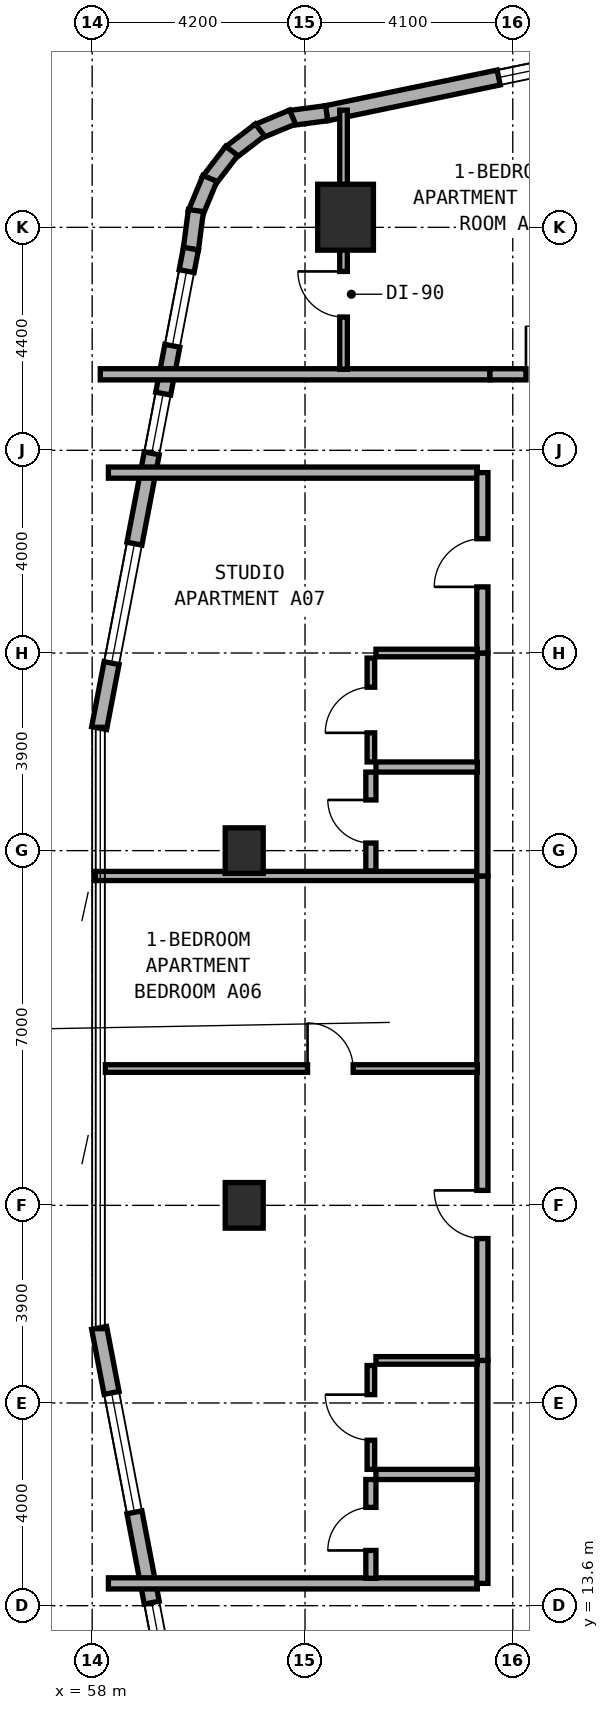
"""IFC4 building model, lengths in metres.
Left out: names, types, materials, properties, quantities, classifications, styles, units other than length and angle.
Written with IfcOpenShell. Run it as: python <this file> out.ifc"""

import sys

from ifc_helpers import new_model, si_unit, direction, frame, frame_2d, origin, origin_2d, place, context, subcontext, project, spatial, rectangle, extrude, element, fill, save


model = new_model("IFC4")
c1 = context("Model", 3, precision=1e-05, world=origin(), true_north=direction((0.0, 1.0)))
c2 = subcontext(c1, "Body", "Model", "MODEL_VIEW")
j1 = project(units=[si_unit("LENGTHUNIT", "METRE"), si_unit("PLANEANGLEUNIT", "RADIAN")], contexts=[c1])
p1 = place(None, origin())
s1 = spatial("IfcSite", under=j1, at=p1, CompositionType="ELEMENT")
p2 = place(p1, origin())
s2 = spatial("IfcBuilding", under=s1, at=p2, CompositionType="ELEMENT")
p3 = place(p2, frame((0.0, 0.0, 31.0)))
s3 = spatial("IfcBuildingStorey", under=s2, at=p3, CompositionType="ELEMENT", Elevation=31.0)
for number, where, z_axis, x_axis in (
    (1, (61.0, 21.5, 0.0), (0.0, 0.0, 1.0), (1.0, 0.0, 0.0)),
    (2, (61.0, 28.5, 0.0), (0.0, 0.0, 1.0), (1.0, 0.0, 0.0)),
):
    element("IfcColumn", number, at=place(p3, frame(where, z_axis=z_axis, x_axis=x_axis)), inside=s3, PredefinedType="COLUMN", context=c2, shape_type="SweptSolid", body=[
        extrude(rectangle(XDim=0.75, YDim=0.9, at=origin_2d()), origin(), (0.0, 0.0, 1.0), 3.5),
    ])
p4 = place(p3, frame((63.0, 41.0, 0.0), z_axis=(0.0, 0.0, 1.0), x_axis=(1.0, 0.0, 0.0)))
e3 = element("IfcColumn", 3, at=p4, inside=s3, PredefinedType="COLUMN", context=c2, shape_type="SweptSolid", body=[
    extrude(rectangle(XDim=1.1, YDim=1.3, at=origin_2d()), origin(), (0.0, 0.0, 1.0), 3.5),
])
p5 = place(p3, frame((71.356, 44.864, 0.0), z_axis=(0.0, 0.0, 1.0), x_axis=(-0.979127260729, -0.203248142175, 0.0)))
e4 = element("IfcWall", 4, at=p5, inside=s3, PredefinedType="STANDARD", context=c2, shape_type="SweptSolid", body=[
    extrude(rectangle(XDim=8.92, YDim=0.3, at=frame_2d((4.46, 0.0))), origin(), (0.0, 0.0, 1.0), 3.25),
])
p6 = place(p5, frame((3.048, 0.0, 0.8)))
e5 = element("IfcOpeningElement", 5, at=p6, cuts=e4, PredefinedType="OPENING", context=c2, shape_type="SweptSolid", body=[
    extrude(rectangle(XDim=2.4, YDim=1.6, at=frame_2d((1.2, 0.8))), frame((0.0, 0.16, 0.0), z_axis=(0.0, -1.0, 0.0), x_axis=(1.0, 0.0, 0.0)), (0.0, 0.0, 1.0), 0.32),
])
p7 = place(p3, frame((62.627, 43.052, 0.0), z_axis=(0.0, 0.0, 1.0), x_axis=(-0.991480488834, -0.130255288807, 0.0)))
e6 = element("IfcWall", 6, at=p7, inside=s3, PredefinedType="STANDARD", context=c2, shape_type="SweptSolid", body=[
    extrude(rectangle(XDim=0.729, YDim=0.3, at=frame_2d((0.365, 0.0))), origin(), (0.0, 0.0, 1.0), 3.25),
])
for number, where, z_axis, x_axis in (
    (7, (61.955, 42.976, 0.0), (0.0, 0.0, 1.0), (-0.924, -0.384, 0.0)),
    (8, (61.311, 42.721, 0.0), (0.0, 0.0, 1.0), (-0.794, -0.608, 0.0)),
    (9, (60.754, 42.309, 0.0), (0.0, 0.0, 1.0), (-0.608, -0.794, 0.0)),
    (10, (60.324, 41.766, 0.0), (0.0, 0.0, 1.0), (-0.383, -0.924, 0.0)),
):
    element("IfcWall", number, at=place(p3, frame(where, z_axis=z_axis, x_axis=x_axis)), inside=s3, PredefinedType="STANDARD", context=c2, shape_type="SweptSolid", body=[
        extrude(rectangle(XDim=0.746, YDim=0.3, at=frame_2d((0.373, 0.0))), origin(), (0.0, 0.0, 1.0), 3.25),
    ])
p8 = place(p3, frame((60.047, 41.131, 0.0), z_axis=(0.0, 0.0, 1.0), x_axis=(-0.129653178221, -0.991559404866, 0.0)))
e11 = element("IfcWall", 11, at=p8, inside=s3, PredefinedType="STANDARD", context=c2, shape_type="SweptSolid", body=[
    extrude(rectangle(XDim=0.764, YDim=0.3, at=frame_2d((0.382, 0.0))), origin(), (0.0, 0.0, 1.0), 3.25),
])
p9 = place(p3, frame((59.949, 40.38, 0.0), z_axis=(0.0, 0.0, 1.0), x_axis=(-0.188087874316, -0.982152203854, 0.0)))
e12 = element("IfcWall", 12, at=p9, inside=s3, PredefinedType="STANDARD", context=c2, shape_type="SweptSolid", body=[
    extrude(rectangle(XDim=9.634, YDim=0.3, at=frame_2d((4.817, 0.0))), origin(), (0.0, 0.0, 1.0), 3.25),
])
p10 = place(p9, frame((0.452, 0.0, 0.85)))
e13 = element("IfcOpeningElement", 13, at=p10, cuts=e12, PredefinedType="OPENING", context=c2, shape_type="SweptSolid", body=[
    extrude(rectangle(XDim=1.5, YDim=1.5, at=frame_2d((0.75, 0.75))), frame((0.0, 0.16, 0.0), z_axis=(0.0, -1.0, 0.0), x_axis=(1.0, 0.0, 0.0)), (0.0, 0.0, 1.0), 0.32),
])
p11 = place(p9, frame((2.913, 0.0, 0.85)))
e14 = element("IfcOpeningElement", 14, at=p11, cuts=e12, PredefinedType="OPENING", context=c2, shape_type="SweptSolid", body=[
    extrude(rectangle(XDim=1.2, YDim=1.5, at=frame_2d((0.6, 0.75))), frame((0.0, 0.16, 0.0), z_axis=(0.0, -1.0, 0.0), x_axis=(1.0, 0.0, 0.0)), (0.0, 0.0, 1.0), 0.32),
])
p12 = place(p9, frame((5.928, 0.0, 0.8)))
e15 = element("IfcOpeningElement", 15, at=p12, cuts=e12, PredefinedType="OPENING", context=c2, shape_type="SweptSolid", body=[
    extrude(rectangle(XDim=2.4, YDim=1.6, at=frame_2d((1.2, 0.8))), frame((0.0, 0.16, 0.0), z_axis=(0.0, -1.0, 0.0), x_axis=(1.0, 0.0, 0.0)), (0.0, 0.0, 1.0), 0.32),
])
p13 = place(p3, frame((58.137, 19.082, 0.0), z_axis=(0.0, 0.0, 1.0), x_axis=(0.188087874316, -0.982152203854, 0.0)))
e16 = element("IfcWall", 16, at=p13, inside=s3, PredefinedType="STANDARD", context=c2, shape_type="SweptSolid", body=[
    extrude(rectangle(XDim=9.634, YDim=0.3, at=frame_2d((4.817, 0.0))), origin(), (0.0, 0.0, 1.0), 3.25),
])
p14 = place(p13, frame((1.306, 0.0, 0.8)))
e17 = element("IfcOpeningElement", 17, at=p14, cuts=e16, PredefinedType="OPENING", context=c2, shape_type="SweptSolid", body=[
    extrude(rectangle(XDim=2.4, YDim=1.6, at=frame_2d((1.2, 0.8))), frame((0.0, 0.16, 0.0), z_axis=(0.0, -1.0, 0.0), x_axis=(1.0, 0.0, 0.0)), (0.0, 0.0, 1.0), 0.32),
])
p15 = place(p13, frame((5.521, 0.0, 0.85)))
e18 = element("IfcOpeningElement", 18, at=p15, cuts=e16, PredefinedType="OPENING", context=c2, shape_type="SweptSolid", body=[
    extrude(rectangle(XDim=1.2, YDim=1.5, at=frame_2d((0.6, 0.75))), frame((0.0, 0.16, 0.0), z_axis=(0.0, -1.0, 0.0), x_axis=(1.0, 0.0, 0.0)), (0.0, 0.0, 1.0), 0.32),
])
p16 = place(p13, frame((7.682, 0.0, 0.85)))
e19 = element("IfcOpeningElement", 19, at=p16, cuts=e16, PredefinedType="OPENING", context=c2, shape_type="SweptSolid", body=[
    extrude(rectangle(XDim=1.5, YDim=1.5, at=frame_2d((0.75, 0.75))), frame((0.0, 0.16, 0.0), z_axis=(0.0, -1.0, 0.0), x_axis=(1.0, 0.0, 0.0)), (0.0, 0.0, 1.0), 0.32),
])
p17 = place(p3, frame((58.16, 37.9, 0.0), z_axis=(0.0, 0.0, 1.0), x_axis=(1.0, 0.0, 0.0)))
e20 = element("IfcWall", 20, at=p17, inside=s3, PredefinedType="SOLIDWALL", context=c2, shape_type="SweptSolid", body=[
    extrude(rectangle(XDim=7.69, YDim=0.22, at=frame_2d((3.845, 0.0))), origin(), (0.0, 0.0, 1.0), 2.865),
])
p18 = place(p3, frame((65.85, 37.9, 0.0), z_axis=(0.0, 0.0, 1.0), x_axis=(1.0, 0.0, 0.0)))
e21 = element("IfcWall", 21, at=p18, inside=s3, PredefinedType="SOLIDWALL", context=c2, shape_type="SweptSolid", body=[
    extrude(rectangle(XDim=2.37, YDim=0.22, at=frame_2d((1.185, 0.0))), origin(), (0.0, 0.0, 1.0), 3.22),
])
p19 = place(p18, frame((0.71, 0.0, 0.0)))
e22 = element("IfcOpeningElement", 22, at=p19, cuts=e21, PredefinedType="OPENING", context=c2, shape_type="SweptSolid", body=[
    extrude(rectangle(XDim=0.95, YDim=2.1, at=frame_2d((0.475, 1.05))), frame((0.0, 0.12, 0.0), z_axis=(0.0, -1.0, 0.0), x_axis=(1.0, 0.0, 0.0)), (0.0, 0.0, 1.0), 0.24),
])
p20 = place(p3, frame((62.96, 38.0, 0.0), z_axis=(0.0, 0.0, 1.0), x_axis=(0.0, 1.0, 0.0)))
e23 = element("IfcWall", 23, at=p20, inside=s3, PredefinedType="PARTITIONING", context=c2, shape_type="SweptSolid", body=[
    extrude(rectangle(XDim=5.113, YDim=0.15, at=frame_2d((2.557, 0.0))), origin(), (0.0, 0.0, 1.0), 2.865),
])
p21 = place(p20, frame((1.03, 0.0, 0.0)))
e24 = element("IfcOpeningElement", 24, at=p21, cuts=e23, PredefinedType="OPENING", context=c2, shape_type="SweptSolid", body=[
    extrude(rectangle(XDim=0.9, YDim=2.1, at=frame_2d((0.45, 1.05))), frame((0.0, 0.085, 0.0), z_axis=(0.0, -1.0, 0.0), x_axis=(1.0, 0.0, 0.0)), (0.0, 0.0, 1.0), 0.17),
])
for number, where, z_axis, x_axis in (
    (25, (58.32, 14.04, 0.0), (0.0, 0.0, 1.0), (1.0, 0.0, 0.0)),
    (26, (58.32, 35.96, 0.0), (0.0, 0.0, 1.0), (1.0, 0.0, 0.0)),
):
    element("IfcWall", number, at=place(p3, frame(where, z_axis=z_axis, x_axis=x_axis)), inside=s3, PredefinedType="SOLIDWALL", context=c2, shape_type="SweptSolid", body=[
        extrude(rectangle(XDim=7.28, YDim=0.22, at=frame_2d((3.64, 0.0))), origin(), (0.0, 0.0, 1.0), 2.865),
    ])
p22 = place(p3, frame((58.06, 28.0, 0.0), z_axis=(0.0, 0.0, 1.0), x_axis=(1.0, 0.0, 0.0)))
e27 = element("IfcWall", 27, at=p22, inside=s3, PredefinedType="SOLIDWALL", context=c2, shape_type="SweptSolid", body=[
    extrude(rectangle(XDim=7.64, YDim=0.18, at=frame_2d((3.82, 0.0))), origin(), (0.0, 0.0, 1.0), 2.865),
])
p23 = place(p3, frame((65.7, 14.04, 0.0), z_axis=(0.0, 0.0, 1.0), x_axis=(0.0, 1.0, 0.0)))
e28 = element("IfcWall", 28, at=p23, inside=s3, PredefinedType="SOLIDWALL", context=c2, shape_type="SweptSolid", body=[
    extrude(rectangle(XDim=4.4, YDim=0.22, at=frame_2d((2.2, 0.0))), origin(), (0.0, 0.0, 1.0), 3.22),
])
p24 = place(p3, frame((65.7, 18.44, 0.0), z_axis=(0.0, 0.0, 1.0), x_axis=(0.0, 1.0, 0.0)))
e29 = element("IfcWall", 29, at=p24, inside=s3, PredefinedType="SOLIDWALL", context=c2, shape_type="SweptSolid", body=[
    extrude(rectangle(XDim=9.56, YDim=0.22, at=frame_2d((4.78, 0.0))), origin(), (0.0, 0.0, 1.0), 2.725),
])
p25 = place(p24, frame((2.405, 0.0, 0.0)))
e30 = element("IfcOpeningElement", 30, at=p25, cuts=e29, PredefinedType="OPENING", context=c2, shape_type="SweptSolid", body=[
    extrude(rectangle(XDim=0.95, YDim=2.1, at=frame_2d((0.475, 1.05))), frame((0.0, 0.12, 0.0), z_axis=(0.0, -1.0, 0.0), x_axis=(1.0, 0.0, 0.0)), (0.0, 0.0, 1.0), 0.24),
])
p26 = place(p3, frame((58.26, 24.2, 0.0), z_axis=(0.0, 0.0, 1.0), x_axis=(1.0, 0.0, 0.0)))
e31 = element("IfcWall", 31, at=p26, inside=s3, PredefinedType="PARTITIONING", context=c2, shape_type="SweptSolid", body=[
    extrude(rectangle(XDim=7.34, YDim=0.15, at=frame_2d((3.67, 0.0))), origin(), (0.0, 0.0, 1.0), 2.865),
])
p27 = place(p26, frame((3.99, 0.0, 0.0)))
e32 = element("IfcOpeningElement", 32, at=p27, cuts=e31, PredefinedType="OPENING", context=c2, shape_type="SweptSolid", body=[
    extrude(rectangle(XDim=0.9, YDim=2.1, at=frame_2d((0.45, 1.05))), frame((0.0, 0.085, 0.0), z_axis=(0.0, -1.0, 0.0), x_axis=(1.0, 0.0, 0.0)), (0.0, 0.0, 1.0), 0.17),
])
p28 = place(p3, frame((63.6, 16.19, 0.0), z_axis=(0.0, 0.0, 1.0), x_axis=(1.0, 0.0, 0.0)))
e33 = element("IfcWall", 33, at=p28, inside=s3, PredefinedType="PLUMBINGWALL", context=c2, shape_type="SweptSolid", body=[
    extrude(rectangle(XDim=2.0, YDim=0.2, at=frame_2d((1.0, 0.0))), origin(), (0.0, 0.0, 1.0), 3.22),
])
p29 = place(p3, frame((63.6, 18.44, 0.0), z_axis=(0.0, 0.0, 1.0), x_axis=(1.0, 0.0, 0.0)))
e34 = element("IfcWall", 34, at=p29, inside=s3, PredefinedType="PARTITIONING", context=c2, shape_type="SweptSolid", body=[
    extrude(rectangle(XDim=2.0, YDim=0.15, at=frame_2d((1.0, 0.0))), origin(), (0.0, 0.0, 1.0), 3.22),
])
p30 = place(p3, frame((63.5, 14.14, 0.0), z_axis=(0.0, 0.0, 1.0), x_axis=(0.0, 1.0, 0.0)))
e35 = element("IfcWall", 35, at=p30, inside=s3, PredefinedType="PLUMBINGWALL", context=c2, shape_type="SweptSolid", body=[
    extrude(rectangle(XDim=1.95, YDim=0.2, at=frame_2d((0.975, 0.0))), origin(), (0.0, 0.0, 1.0), 3.22),
])
p31 = place(p30, frame((0.55, 0.0, 0.0)))
e36 = element("IfcOpeningElement", 36, at=p31, cuts=e35, PredefinedType="OPENING", context=c2, shape_type="SweptSolid", body=[
    extrude(rectangle(XDim=0.85, YDim=2.1, at=frame_2d((0.425, 1.05))), frame((0.0, 0.11, 0.0), z_axis=(0.0, -1.0, 0.0), x_axis=(1.0, 0.0, 0.0)), (0.0, 0.0, 1.0), 0.22),
])
p32 = place(p3, frame((63.5, 16.29, 0.0), z_axis=(0.0, 0.0, 1.0), x_axis=(0.0, 1.0, 0.0)))
e37 = element("IfcWall", 37, at=p32, inside=s3, PredefinedType="PARTITIONING", context=c2, shape_type="SweptSolid", body=[
    extrude(rectangle(XDim=2.05, YDim=0.15, at=frame_2d((1.025, 0.0))), origin(), (0.0, 0.0, 1.0), 3.22),
])
p33 = place(p32, frame((0.575, 0.0, 0.0)))
e38 = element("IfcOpeningElement", 38, at=p33, cuts=e37, PredefinedType="OPENING", context=c2, shape_type="SweptSolid", body=[
    extrude(rectangle(XDim=0.9, YDim=2.1, at=frame_2d((0.45, 1.05))), frame((0.0, 0.085, 0.0), z_axis=(0.0, -1.0, 0.0), x_axis=(1.0, 0.0, 0.0)), (0.0, 0.0, 1.0), 0.17),
])
p34 = place(p3, frame((65.7, 28.0, 0.0), z_axis=(0.0, 0.0, 1.0), x_axis=(0.0, 1.0, 0.0)))
e39 = element("IfcWall", 39, at=p34, inside=s3, PredefinedType="SOLIDWALL", context=c2, shape_type="SweptSolid", body=[
    extrude(rectangle(XDim=4.4, YDim=0.22, at=frame_2d((2.2, 0.0))), origin(), (0.0, 0.0, 1.0), 2.725),
])
p35 = place(p3, frame((65.7, 32.4, 0.0), z_axis=(0.0, 0.0, 1.0), x_axis=(0.0, 1.0, 0.0)))
e40 = element("IfcWall", 40, at=p35, inside=s3, PredefinedType="SOLIDWALL", context=c2, shape_type="SweptSolid", body=[
    extrude(rectangle(XDim=3.56, YDim=0.22, at=frame_2d((1.78, 0.0))), origin(), (0.0, 0.0, 1.0), 3.22),
])
p36 = place(p35, frame((1.305, 0.0, 0.0)))
e41 = element("IfcOpeningElement", 41, at=p36, cuts=e40, PredefinedType="OPENING", context=c2, shape_type="SweptSolid", body=[
    extrude(rectangle(XDim=0.95, YDim=2.1, at=frame_2d((0.475, 1.05))), frame((0.0, 0.12, 0.0), z_axis=(0.0, -1.0, 0.0), x_axis=(1.0, 0.0, 0.0)), (0.0, 0.0, 1.0), 0.24),
])
p37 = place(p3, frame((63.6, 30.15, 0.0), z_axis=(0.0, 0.0, 1.0), x_axis=(1.0, 0.0, 0.0)))
e42 = element("IfcWall", 42, at=p37, inside=s3, PredefinedType="PLUMBINGWALL", context=c2, shape_type="SweptSolid", body=[
    extrude(rectangle(XDim=2.0, YDim=0.2, at=frame_2d((1.0, 0.0))), origin(), (0.0, 0.0, 1.0), 3.22),
])
p38 = place(p3, frame((63.6, 32.4, 0.0), z_axis=(0.0, 0.0, 1.0), x_axis=(1.0, 0.0, 0.0)))
e43 = element("IfcWall", 43, at=p38, inside=s3, PredefinedType="PARTITIONING", context=c2, shape_type="SweptSolid", body=[
    extrude(rectangle(XDim=2.0, YDim=0.15, at=frame_2d((1.0, 0.0))), origin(), (0.0, 0.0, 1.0), 3.22),
])
p39 = place(p3, frame((63.5, 28.1, 0.0), z_axis=(0.0, 0.0, 1.0), x_axis=(0.0, 1.0, 0.0)))
e44 = element("IfcWall", 44, at=p39, inside=s3, PredefinedType="PLUMBINGWALL", context=c2, shape_type="SweptSolid", body=[
    extrude(rectangle(XDim=1.95, YDim=0.2, at=frame_2d((0.975, 0.0))), origin(), (0.0, 0.0, 1.0), 2.725),
])
p40 = place(p39, frame((0.55, 0.0, 0.0)))
e45 = element("IfcOpeningElement", 45, at=p40, cuts=e44, PredefinedType="OPENING", context=c2, shape_type="SweptSolid", body=[
    extrude(rectangle(XDim=0.85, YDim=2.1, at=frame_2d((0.425, 1.05))), frame((0.0, 0.11, 0.0), z_axis=(0.0, -1.0, 0.0), x_axis=(1.0, 0.0, 0.0)), (0.0, 0.0, 1.0), 0.22),
])
p41 = place(p3, frame((63.5, 30.25, 0.0), z_axis=(0.0, 0.0, 1.0), x_axis=(0.0, 1.0, 0.0)))
e46 = element("IfcWall", 46, at=p41, inside=s3, PredefinedType="PARTITIONING", context=c2, shape_type="SweptSolid", body=[
    extrude(rectangle(XDim=2.05, YDim=0.15, at=frame_2d((1.025, 0.0))), origin(), (0.0, 0.0, 1.0), 3.22),
])
p42 = place(p41, frame((0.575, 0.0, 0.0)))
e47 = element("IfcOpeningElement", 47, at=p42, cuts=e46, PredefinedType="OPENING", context=c2, shape_type="SweptSolid", body=[
    extrude(rectangle(XDim=0.9, YDim=2.1, at=frame_2d((0.45, 1.05))), frame((0.0, 0.085, 0.0), z_axis=(0.0, -1.0, 0.0), x_axis=(1.0, 0.0, 0.0)), (0.0, 0.0, 1.0), 0.17),
])
p43 = place(p6, origin())
e48 = element("IfcWindow", 48, at=p43, inside=s3, PartitioningType="SINGLE_PANEL", PredefinedType="WINDOW", context=c2, shape_type="SweptSolid", body=[
    extrude(rectangle(XDim=2.4, YDim=1.6, at=frame_2d((1.2, 0.8))), frame((0.0, 0.03, 0.0), z_axis=(0.0, -1.0, 0.0), x_axis=(1.0, 0.0, 0.0)), (0.0, 0.0, 1.0), 0.06),
])
fill(e5, e48)
p44 = place(p10, origin())
e49 = element("IfcWindow", 49, at=p44, inside=s3, PartitioningType="SINGLE_PANEL", PredefinedType="WINDOW", context=c2, shape_type="SweptSolid", body=[
    extrude(rectangle(XDim=1.5, YDim=1.5, at=frame_2d((0.75, 0.75))), frame((0.0, 0.03, 0.0), z_axis=(0.0, -1.0, 0.0), x_axis=(1.0, 0.0, 0.0)), (0.0, 0.0, 1.0), 0.06),
])
fill(e13, e49)
p45 = place(p11, origin())
e50 = element("IfcWindow", 50, at=p45, inside=s3, PartitioningType="SINGLE_PANEL", PredefinedType="WINDOW", context=c2, shape_type="SweptSolid", body=[
    extrude(rectangle(XDim=1.2, YDim=1.5, at=frame_2d((0.6, 0.75))), frame((0.0, 0.03, 0.0), z_axis=(0.0, -1.0, 0.0), x_axis=(1.0, 0.0, 0.0)), (0.0, 0.0, 1.0), 0.06),
])
fill(e14, e50)
p46 = place(p12, origin())
e51 = element("IfcWindow", 51, at=p46, inside=s3, PartitioningType="SINGLE_PANEL", PredefinedType="WINDOW", context=c2, shape_type="SweptSolid", body=[
    extrude(rectangle(XDim=2.4, YDim=1.6, at=frame_2d((1.2, 0.8))), frame((0.0, 0.03, 0.0), z_axis=(0.0, -1.0, 0.0), x_axis=(1.0, 0.0, 0.0)), (0.0, 0.0, 1.0), 0.06),
])
fill(e15, e51)
p47 = place(p14, origin())
e52 = element("IfcWindow", 52, at=p47, inside=s3, PartitioningType="SINGLE_PANEL", PredefinedType="WINDOW", context=c2, shape_type="SweptSolid", body=[
    extrude(rectangle(XDim=2.4, YDim=1.6, at=frame_2d((1.2, 0.8))), frame((0.0, 0.03, 0.0), z_axis=(0.0, -1.0, 0.0), x_axis=(1.0, 0.0, 0.0)), (0.0, 0.0, 1.0), 0.06),
])
fill(e17, e52)
p48 = place(p15, origin())
e53 = element("IfcWindow", 53, at=p48, inside=s3, PartitioningType="SINGLE_PANEL", PredefinedType="WINDOW", context=c2, shape_type="SweptSolid", body=[
    extrude(rectangle(XDim=1.2, YDim=1.5, at=frame_2d((0.6, 0.75))), frame((0.0, 0.03, 0.0), z_axis=(0.0, -1.0, 0.0), x_axis=(1.0, 0.0, 0.0)), (0.0, 0.0, 1.0), 0.06),
])
fill(e18, e53)
p49 = place(p19, origin())
e54 = element("IfcDoor", 54, at=p49, inside=s3, OperationType="SINGLE_SWING_LEFT", PredefinedType="DOOR", context=c2, shape_type="SweptSolid", body=[
    extrude(rectangle(XDim=0.95, YDim=2.1, at=frame_2d((0.475, 1.05))), frame((0.0, 0.025, 0.0), z_axis=(0.0, -1.0, 0.0), x_axis=(1.0, 0.0, 0.0)), (0.0, 0.0, 1.0), 0.05),
])
fill(e22, e54)
p50 = place(p21, origin())
e55 = element("IfcDoor", 55, at=p50, inside=s3, OperationType="SINGLE_SWING_RIGHT", PredefinedType="DOOR", context=c2, shape_type="SweptSolid", body=[
    extrude(rectangle(XDim=0.9, YDim=2.1, at=frame_2d((0.45, 1.05))), frame((0.0, 0.025, 0.0), z_axis=(0.0, -1.0, 0.0), x_axis=(1.0, 0.0, 0.0)), (0.0, 0.0, 1.0), 0.05),
])
fill(e24, e55)
p51 = place(p25, origin())
e56 = element("IfcDoor", 56, at=p51, inside=s3, OperationType="SINGLE_SWING_RIGHT", PredefinedType="DOOR", context=c2, shape_type="SweptSolid", body=[
    extrude(rectangle(XDim=0.95, YDim=2.1, at=frame_2d((0.475, 1.05))), frame((0.0, 0.025, 0.0), z_axis=(0.0, -1.0, 0.0), x_axis=(1.0, 0.0, 0.0)), (0.0, 0.0, 1.0), 0.05),
])
fill(e30, e56)
p52 = place(p27, origin())
e57 = element("IfcDoor", 57, at=p52, inside=s3, OperationType="SINGLE_SWING_LEFT", PredefinedType="DOOR", context=c2, shape_type="SweptSolid", body=[
    extrude(rectangle(XDim=0.9, YDim=2.1, at=frame_2d((0.45, 1.05))), frame((0.0, 0.025, 0.0), z_axis=(0.0, -1.0, 0.0), x_axis=(1.0, 0.0, 0.0)), (0.0, 0.0, 1.0), 0.05),
])
fill(e32, e57)
p53 = place(p31, origin())
e58 = element("IfcDoor", 58, at=p53, inside=s3, OperationType="SINGLE_SWING_LEFT", PredefinedType="DOOR", context=c2, shape_type="SweptSolid", body=[
    extrude(rectangle(XDim=0.85, YDim=2.1, at=frame_2d((0.425, 1.05))), frame((0.0, 0.025, 0.0), z_axis=(0.0, -1.0, 0.0), x_axis=(1.0, 0.0, 0.0)), (0.0, 0.0, 1.0), 0.05),
])
fill(e36, e58)
p54 = place(p33, origin())
e59 = element("IfcDoor", 59, at=p54, inside=s3, OperationType="SINGLE_SWING_RIGHT", PredefinedType="DOOR", context=c2, shape_type="SweptSolid", body=[
    extrude(rectangle(XDim=0.9, YDim=2.1, at=frame_2d((0.45, 1.05))), frame((0.0, 0.025, 0.0), z_axis=(0.0, -1.0, 0.0), x_axis=(1.0, 0.0, 0.0)), (0.0, 0.0, 1.0), 0.05),
])
fill(e38, e59)
p55 = place(p36, origin())
e60 = element("IfcDoor", 60, at=p55, inside=s3, OperationType="SINGLE_SWING_LEFT", PredefinedType="DOOR", context=c2, shape_type="SweptSolid", body=[
    extrude(rectangle(XDim=0.95, YDim=2.1, at=frame_2d((0.475, 1.05))), frame((0.0, 0.025, 0.0), z_axis=(0.0, -1.0, 0.0), x_axis=(1.0, 0.0, 0.0)), (0.0, 0.0, 1.0), 0.05),
])
fill(e41, e60)
p56 = place(p40, origin())
e61 = element("IfcDoor", 61, at=p56, inside=s3, OperationType="SINGLE_SWING_RIGHT", PredefinedType="DOOR", context=c2, shape_type="SweptSolid", body=[
    extrude(rectangle(XDim=0.85, YDim=2.1, at=frame_2d((0.425, 1.05))), frame((0.0, 0.025, 0.0), z_axis=(0.0, -1.0, 0.0), x_axis=(1.0, 0.0, 0.0)), (0.0, 0.0, 1.0), 0.05),
])
fill(e45, e61)
p57 = place(p42, origin())
e62 = element("IfcDoor", 62, at=p57, inside=s3, OperationType="SINGLE_SWING_LEFT", PredefinedType="DOOR", context=c2, shape_type="SweptSolid", body=[
    extrude(rectangle(XDim=0.9, YDim=2.1, at=frame_2d((0.45, 1.05))), frame((0.0, 0.025, 0.0), z_axis=(0.0, -1.0, 0.0), x_axis=(1.0, 0.0, 0.0)), (0.0, 0.0, 1.0), 0.05),
])
fill(e47, e62)
save(model, sys.argv[1])
